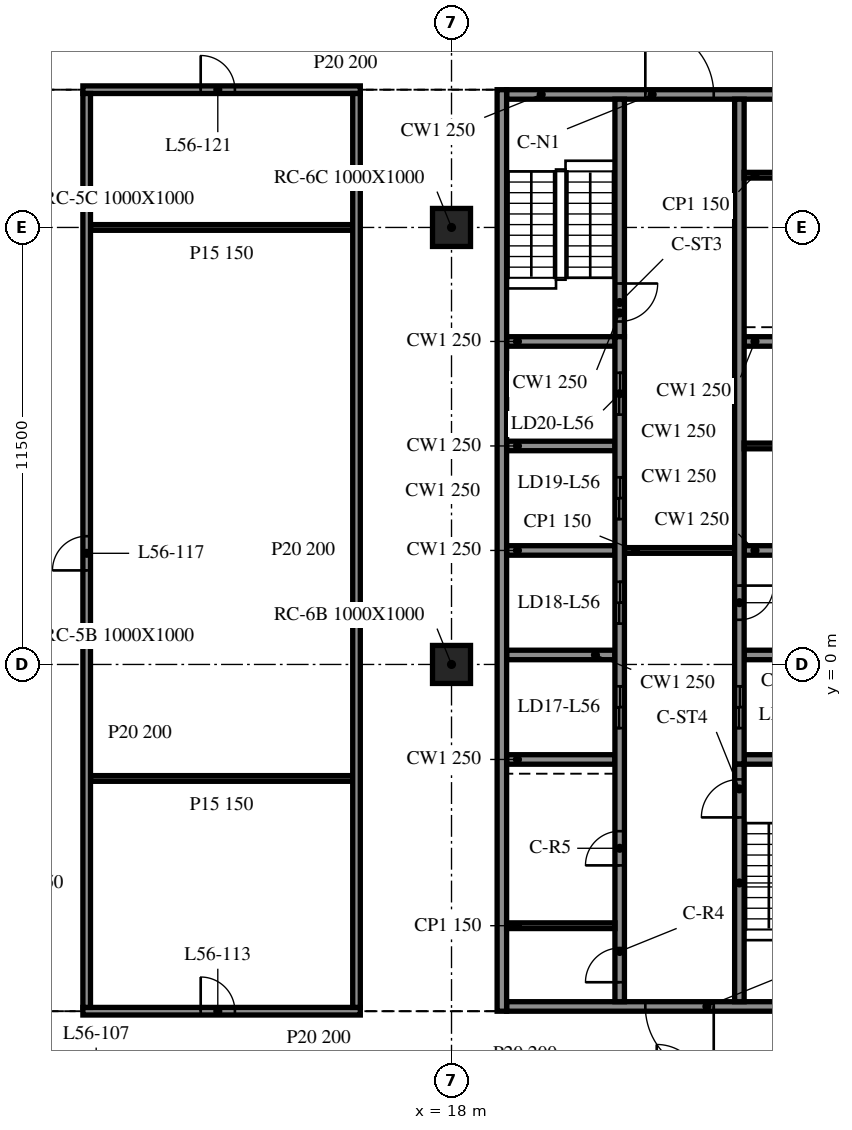
"""IFC4 building model, lengths in metres.
Left out: names, types, materials, properties, quantities, classifications, styles, units other than length and angle.
Written with IfcOpenShell. Run it as: python <this file> out.ifc"""

import sys

from ifc_helpers import new_model, si_unit, direction, frame, frame_2d, origin, origin_2d, place, context, subcontext, project, spatial, rectangle, extrude, element, fill, save


model = new_model("IFC4")
c1 = context("Model", 3, precision=1e-05, world=origin(), true_north=direction((0.0, 1.0)))
c2 = subcontext(c1, "Body", "Model", "MODEL_VIEW")
j1 = project(units=[si_unit("LENGTHUNIT", "METRE"), si_unit("PLANEANGLEUNIT", "RADIAN")], contexts=[c1])
p1 = place(None, origin())
s1 = spatial("IfcSite", under=j1, at=p1, CompositionType="ELEMENT")
p2 = place(p1, origin())
s2 = spatial("IfcBuilding", under=s1, at=p2, CompositionType="ELEMENT")
p3 = place(p2, frame((0.0, 0.0, 232.4)))
s3 = spatial("IfcBuildingStorey", under=s2, at=p3, CompositionType="ELEMENT", Elevation=232.4)
for number, where, z_axis, x_axis in (
    (1, (18.0, 0.0, -0.34), (0.0, 0.0, 1.0), (1.0, 0.0, 0.0)),
    (2, (18.0, 11.5, -0.34), (0.0, 0.0, 1.0), (1.0, 0.0, 0.0)),
):
    element("IfcColumn", number, at=place(p3, frame(where, z_axis=z_axis, x_axis=x_axis)), inside=s3, PredefinedType="COLUMN", context=c2, shape_type="SweptSolid", body=[
        extrude(rectangle(XDim=1.0, YDim=1.0, at=origin_2d()), origin(), (0.0, 0.0, 1.0), 3.8),
    ])
p4 = place(p3, frame((19.325, 15.125, 0.0), z_axis=(0.0, 0.0, 1.0), x_axis=(0.0, -1.0, 0.0)))
e3 = element("IfcWall", 3, at=p4, inside=s3, PredefinedType="SOLIDWALL", context=c2, shape_type="SweptSolid", body=[
    extrude(rectangle(XDim=24.25, YDim=0.25, at=frame_2d((12.125, 0.0))), origin(), (0.0, 0.0, 1.0), 3.46),
])
p5 = place(p3, frame((28.55, -9.0, 0.0), z_axis=(0.0, 0.0, 1.0), x_axis=(-1.0, 0.0, 0.0)))
e4 = element("IfcWall", 4, at=p5, inside=s3, PredefinedType="SOLIDWALL", context=c2, shape_type="SweptSolid", body=[
    extrude(rectangle(XDim=9.1, YDim=0.25, at=frame_2d((4.55, 0.0))), origin(), (0.0, 0.0, 1.0), 3.46),
])
p6 = place(p5, frame((3.65, 0.0, 0.0)))
e5 = element("IfcOpeningElement", 5, at=p6, cuts=e4, PredefinedType="OPENING", context=c2, shape_type="SweptSolid", body=[
    extrude(rectangle(XDim=1.8, YDim=2.1, at=frame_2d((0.9, 1.05))), frame((0.0, 0.135, 0.0), z_axis=(0.0, -1.0, 0.0), x_axis=(1.0, 0.0, 0.0)), (0.0, 0.0, 1.0), 0.27),
])
p7 = place(p3, frame((19.45, 15.0, 0.0), z_axis=(0.0, 0.0, 1.0), x_axis=(1.0, 0.0, 0.0)))
e6 = element("IfcWall", 6, at=p7, inside=s3, PredefinedType="SOLIDWALL", context=c2, shape_type="SweptSolid", body=[
    extrude(rectangle(XDim=9.1, YDim=0.25, at=frame_2d((4.55, 0.0))), origin(), (0.0, 0.0, 1.0), 3.46),
])
p8 = place(p7, frame((3.65, 0.0, 0.0)))
e7 = element("IfcOpeningElement", 7, at=p8, cuts=e6, PredefinedType="OPENING", context=c2, shape_type="SweptSolid", body=[
    extrude(rectangle(XDim=1.8, YDim=2.1, at=frame_2d((0.9, 1.05))), frame((0.0, 0.135, 0.0), z_axis=(0.0, -1.0, 0.0), x_axis=(1.0, 0.0, 0.0)), (0.0, 0.0, 1.0), 0.27),
])
p9 = place(p3, frame((22.425, -8.875, 0.0), z_axis=(0.0, 0.0, 1.0), x_axis=(0.0, 1.0, 0.0)))
e8 = element("IfcWall", 8, at=p9, inside=s3, PredefinedType="SOLIDWALL", context=c2, shape_type="SweptSolid", body=[
    extrude(rectangle(XDim=17.5, YDim=0.25, at=frame_2d((8.75, 0.0))), origin(), (0.0, 0.0, 1.0), 3.46),
])
p10 = place(p9, frame((7.2, 0.0, 0.0)))
e9 = element("IfcOpeningElement", 9, at=p10, cuts=e8, PredefinedType="OPENING", context=c2, shape_type="SweptSolid", body=[
    extrude(rectangle(XDim=1.1, YDim=2.1, at=frame_2d((0.55, 1.05))), frame((0.0, 0.135, 0.0), z_axis=(0.0, -1.0, 0.0), x_axis=(1.0, 0.0, 0.0)), (0.0, 0.0, 1.0), 0.27),
])
p11 = place(p9, frame((9.95, 0.0, 0.0)))
e10 = element("IfcOpeningElement", 10, at=p11, cuts=e8, PredefinedType="OPENING", context=c2, shape_type="SweptSolid", body=[
    extrude(rectangle(XDim=1.1, YDim=2.1, at=frame_2d((0.55, 1.05))), frame((0.0, 0.135, 0.0), z_axis=(0.0, -1.0, 0.0), x_axis=(1.0, 0.0, 0.0)), (0.0, 0.0, 1.0), 0.27),
])
p12 = place(p9, frame((12.7, 0.0, 0.0)))
e11 = element("IfcOpeningElement", 11, at=p12, cuts=e8, PredefinedType="OPENING", context=c2, shape_type="SweptSolid", body=[
    extrude(rectangle(XDim=1.1, YDim=2.1, at=frame_2d((0.55, 1.05))), frame((0.0, 0.135, 0.0), z_axis=(0.0, -1.0, 0.0), x_axis=(1.0, 0.0, 0.0)), (0.0, 0.0, 1.0), 0.27),
])
p13 = place(p9, frame((15.45, 0.0, 0.0)))
e12 = element("IfcOpeningElement", 12, at=p13, cuts=e8, PredefinedType="OPENING", context=c2, shape_type="SweptSolid", body=[
    extrude(rectangle(XDim=1.1, YDim=2.1, at=frame_2d((0.55, 1.05))), frame((0.0, 0.135, 0.0), z_axis=(0.0, -1.0, 0.0), x_axis=(1.0, 0.0, 0.0)), (0.0, 0.0, 1.0), 0.27),
])
p14 = place(p9, frame((0.512, 0.0, 0.0)))
e13 = element("IfcOpeningElement", 13, at=p14, cuts=e8, PredefinedType="OPENING", context=c2, shape_type="SweptSolid", body=[
    extrude(rectangle(XDim=0.9, YDim=2.1, at=frame_2d((0.45, 1.05))), frame((0.0, 0.135, 0.0), z_axis=(0.0, -1.0, 0.0), x_axis=(1.0, 0.0, 0.0)), (0.0, 0.0, 1.0), 0.27),
])
p15 = place(p9, frame((3.587, 0.0, 0.0)))
e14 = element("IfcOpeningElement", 14, at=p15, cuts=e8, PredefinedType="OPENING", context=c2, shape_type="SweptSolid", body=[
    extrude(rectangle(XDim=0.9, YDim=2.1, at=frame_2d((0.45, 1.05))), frame((0.0, 0.135, 0.0), z_axis=(0.0, -1.0, 0.0), x_axis=(1.0, 0.0, 0.0)), (0.0, 0.0, 1.0), 0.27),
])
p16 = place(p3, frame((22.425, 14.875, 0.0), z_axis=(0.0, 0.0, 1.0), x_axis=(0.0, -1.0, 0.0)))
e15 = element("IfcWall", 15, at=p16, inside=s3, PredefinedType="SOLIDWALL", context=c2, shape_type="SweptSolid", body=[
    extrude(rectangle(XDim=6.25, YDim=0.25, at=frame_2d((3.125, 0.0))), origin(), (0.0, 0.0, 1.0), 3.46),
])
p17 = place(p16, frame((4.85, 0.0, 0.0)))
e16 = element("IfcOpeningElement", 16, at=p17, cuts=e15, PredefinedType="OPENING", context=c2, shape_type="SweptSolid", body=[
    extrude(rectangle(XDim=1.0, YDim=2.1, at=frame_2d((0.5, 1.05))), frame((0.0, 0.135, 0.0), z_axis=(0.0, -1.0, 0.0), x_axis=(1.0, 0.0, 0.0)), (0.0, 0.0, 1.0), 0.27),
])
p18 = place(p3, frame((25.575, -8.875, 0.0), z_axis=(0.0, 0.0, 1.0), x_axis=(0.0, 1.0, 0.0)))
e17 = element("IfcWall", 17, at=p18, inside=s3, PredefinedType="SOLIDWALL", context=c2, shape_type="SweptSolid", body=[
    extrude(rectangle(XDim=6.25, YDim=0.25, at=frame_2d((3.125, 0.0))), origin(), (0.0, 0.0, 1.0), 3.46),
])
p19 = place(p18, frame((4.85, 0.0, 0.0)))
e18 = element("IfcOpeningElement", 18, at=p19, cuts=e17, PredefinedType="OPENING", context=c2, shape_type="SweptSolid", body=[
    extrude(rectangle(XDim=1.0, YDim=2.1, at=frame_2d((0.5, 1.05))), frame((0.0, 0.135, 0.0), z_axis=(0.0, -1.0, 0.0), x_axis=(1.0, 0.0, 0.0)), (0.0, 0.0, 1.0), 0.27),
])
p20 = place(p3, frame((25.575, 14.875, 0.0), z_axis=(0.0, 0.0, 1.0), x_axis=(0.0, -1.0, 0.0)))
e19 = element("IfcWall", 19, at=p20, inside=s3, PredefinedType="SOLIDWALL", context=c2, shape_type="SweptSolid", body=[
    extrude(rectangle(XDim=17.5, YDim=0.25, at=frame_2d((8.75, 0.0))), origin(), (0.0, 0.0, 1.0), 3.46),
])
p21 = place(p20, frame((15.45, 0.0, 0.0)))
e20 = element("IfcOpeningElement", 20, at=p21, cuts=e19, PredefinedType="OPENING", context=c2, shape_type="SweptSolid", body=[
    extrude(rectangle(XDim=1.1, YDim=2.1, at=frame_2d((0.55, 1.05))), frame((0.0, 0.135, 0.0), z_axis=(0.0, -1.0, 0.0), x_axis=(1.0, 0.0, 0.0)), (0.0, 0.0, 1.0), 0.27),
])
p22 = place(p20, frame((12.8, 0.0, 0.0)))
e21 = element("IfcOpeningElement", 21, at=p22, cuts=e19, PredefinedType="OPENING", context=c2, shape_type="SweptSolid", body=[
    extrude(rectangle(XDim=0.9, YDim=2.1, at=frame_2d((0.45, 1.05))), frame((0.0, 0.135, 0.0), z_axis=(0.0, -1.0, 0.0), x_axis=(1.0, 0.0, 0.0)), (0.0, 0.0, 1.0), 0.27),
])
for number, where, z_axis, x_axis in (
    (22, (19.45, -2.5, 0.0), (0.0, 0.0, 1.0), (1.0, 0.0, 0.0)),
    (23, (19.45, 0.25, 0.0), (0.0, 0.0, 1.0), (1.0, 0.0, 0.0)),
    (24, (19.45, 3.0, 0.0), (0.0, 0.0, 1.0), (1.0, 0.0, 0.0)),
    (25, (19.45, 5.75, 0.0), (0.0, 0.0, 1.0), (1.0, 0.0, 0.0)),
    (26, (19.45, 8.5, 0.0), (0.0, 0.0, 1.0), (1.0, 0.0, 0.0)),
    (27, (25.7, -2.5, 0.0), (0.0, 0.0, 1.0), (1.0, 0.0, 0.0)),
    (28, (25.7, 0.25, 0.0), (0.0, 0.0, 1.0), (1.0, 0.0, 0.0)),
    (29, (25.7, 3.0, 0.0), (0.0, 0.0, 1.0), (1.0, 0.0, 0.0)),
    (30, (25.7, 8.5, 0.0), (0.0, 0.0, 1.0), (1.0, 0.0, 0.0)),
):
    element("IfcWall", number, at=place(p3, frame(where, z_axis=z_axis, x_axis=x_axis)), inside=s3, PredefinedType="SOLIDWALL", context=c2, shape_type="SweptSolid", body=[
        extrude(rectangle(XDim=2.85, YDim=0.25, at=frame_2d((1.425, 0.0))), origin(), (0.0, 0.0, 1.0), 3.46),
    ])
p23 = place(p3, frame((22.55, 3.0, 0.0), z_axis=(0.0, 0.0, 1.0), x_axis=(1.0, 0.0, 0.0)))
e31 = element("IfcWall", 31, at=p23, inside=s3, PredefinedType="PARTITIONING", context=c2, shape_type="SweptSolid", body=[
    extrude(rectangle(XDim=2.9, YDim=0.15, at=frame_2d((1.45, 0.0))), origin(), (0.0, 0.0, 1.0), 3.46),
])
for number, where, z_axis, x_axis in (
    (32, (25.7, 5.75, 0.0), (0.0, 0.0, 1.0), (1.0, 0.0, 0.0)),
    (33, (19.45, -6.875, 0.0), (0.0, 0.0, 1.0), (1.0, 0.0, 0.0)),
    (34, (25.7, 12.875, 0.0), (0.0, 0.0, 1.0), (1.0, 0.0, 0.0)),
):
    element("IfcWall", number, at=place(p3, frame(where, z_axis=z_axis, x_axis=x_axis)), inside=s3, PredefinedType="PARTITIONING", context=c2, shape_type="SweptSolid", body=[
        extrude(rectangle(XDim=2.85, YDim=0.15, at=frame_2d((1.425, 0.0))), origin(), (0.0, 0.0, 1.0), 3.46),
    ])
p24 = place(p3, frame((8.3, -9.125, 0.0), z_axis=(0.0, 0.0, 1.0), x_axis=(1.0, 0.0, 0.0)))
e35 = element("IfcWall", 35, at=p24, inside=s3, PredefinedType="PARTITIONING", context=c2, shape_type="SweptSolid", body=[
    extrude(rectangle(XDim=7.3, YDim=0.2, at=frame_2d((3.65, 0.0))), origin(), (0.0, 0.0, 1.0), 3.46),
])
p25 = place(p24, frame((3.1, 0.0, 0.0)))
e36 = element("IfcOpeningElement", 36, at=p25, cuts=e35, PredefinedType="OPENING", context=c2, shape_type="SweptSolid", body=[
    extrude(rectangle(XDim=0.9, YDim=2.1, at=frame_2d((0.45, 1.05))), frame((0.0, 0.11, 0.0), z_axis=(0.0, -1.0, 0.0), x_axis=(1.0, 0.0, 0.0)), (0.0, 0.0, 1.0), 0.22),
])
for number, where, z_axis, x_axis in (
    (37, (8.5, -3.0, 0.0), (0.0, 0.0, 1.0), (1.0, 0.0, 0.0)),
    (38, (8.5, 11.5, 0.0), (0.0, 0.0, 1.0), (1.0, 0.0, 0.0)),
):
    element("IfcWall", number, at=place(p3, frame(where, z_axis=z_axis, x_axis=x_axis)), inside=s3, PredefinedType="PARTITIONING", context=c2, shape_type="SweptSolid", body=[
        extrude(rectangle(XDim=6.9, YDim=0.15, at=frame_2d((3.45, 0.0))), origin(), (0.0, 0.0, 1.0), 3.46),
    ])
p26 = place(p3, frame((8.3, 15.125, 0.0), z_axis=(0.0, 0.0, 1.0), x_axis=(1.0, 0.0, 0.0)))
e39 = element("IfcWall", 39, at=p26, inside=s3, PredefinedType="PARTITIONING", context=c2, shape_type="SweptSolid", body=[
    extrude(rectangle(XDim=7.3, YDim=0.2, at=frame_2d((3.65, 0.0))), origin(), (0.0, 0.0, 1.0), 3.46),
])
p27 = place(p26, frame((3.1, 0.0, 0.0)))
e40 = element("IfcOpeningElement", 40, at=p27, cuts=e39, PredefinedType="OPENING", context=c2, shape_type="SweptSolid", body=[
    extrude(rectangle(XDim=0.9, YDim=2.1, at=frame_2d((0.45, 1.05))), frame((0.0, 0.11, 0.0), z_axis=(0.0, -1.0, 0.0), x_axis=(1.0, 0.0, 0.0)), (0.0, 0.0, 1.0), 0.22),
])
p28 = place(p3, frame((8.4, -9.025, 0.0), z_axis=(0.0, 0.0, 1.0), x_axis=(0.0, 1.0, 0.0)))
e41 = element("IfcWall", 41, at=p28, inside=s3, PredefinedType="PARTITIONING", context=c2, shape_type="SweptSolid", body=[
    extrude(rectangle(XDim=24.05, YDim=0.2, at=frame_2d((12.025, 0.0))), origin(), (0.0, 0.0, 1.0), 3.46),
])
p29 = place(p28, frame((11.5, 0.0, 0.0)))
e42 = element("IfcOpeningElement", 42, at=p29, cuts=e41, PredefinedType="OPENING", context=c2, shape_type="SweptSolid", body=[
    extrude(rectangle(XDim=0.9, YDim=2.1, at=frame_2d((0.45, 1.05))), frame((0.0, 0.11, 0.0), z_axis=(0.0, -1.0, 0.0), x_axis=(1.0, 0.0, 0.0)), (0.0, 0.0, 1.0), 0.22),
])
p30 = place(p3, frame((15.5, -9.025, 0.0), z_axis=(0.0, 0.0, 1.0), x_axis=(0.0, 1.0, 0.0)))
e43 = element("IfcWall", 43, at=p30, inside=s3, PredefinedType="PARTITIONING", context=c2, shape_type="SweptSolid", body=[
    extrude(rectangle(XDim=24.05, YDim=0.2, at=frame_2d((12.025, 0.0))), origin(), (0.0, 0.0, 1.0), 3.46),
])
p31 = place(p6, origin())
e44 = element("IfcDoor", 44, at=p31, inside=s3, OperationType="DOUBLE_DOOR_SINGLE_SWING", PredefinedType="DOOR", context=c2, shape_type="SweptSolid", body=[
    extrude(rectangle(XDim=1.8, YDim=2.1, at=frame_2d((0.9, 1.05))), frame((0.0, 0.025, 0.0), z_axis=(0.0, -1.0, 0.0), x_axis=(1.0, 0.0, 0.0)), (0.0, 0.0, 1.0), 0.05),
])
fill(e5, e44)
p32 = place(p8, origin())
e45 = element("IfcDoor", 45, at=p32, inside=s3, OperationType="DOUBLE_DOOR_SINGLE_SWING", PredefinedType="DOOR", context=c2, shape_type="SweptSolid", body=[
    extrude(rectangle(XDim=1.8, YDim=2.1, at=frame_2d((0.9, 1.05))), frame((0.0, 0.025, 0.0), z_axis=(0.0, -1.0, 0.0), x_axis=(1.0, 0.0, 0.0)), (0.0, 0.0, 1.0), 0.05),
])
fill(e7, e45)
p33 = place(p21, origin())
e46 = element("IfcDoor", 46, at=p33, inside=s3, OperationType="DOUBLE_DOOR_SLIDING", PredefinedType="DOOR", context=c2, shape_type="SweptSolid", body=[
    extrude(rectangle(XDim=1.1, YDim=2.1, at=frame_2d((0.55, 1.05))), frame((0.0, 0.025, 0.0), z_axis=(0.0, -1.0, 0.0), x_axis=(1.0, 0.0, 0.0)), (0.0, 0.0, 1.0), 0.05),
])
fill(e20, e46)
p34 = place(p10, origin())
e47 = element("IfcDoor", 47, at=p34, inside=s3, OperationType="DOUBLE_DOOR_SLIDING", PredefinedType="DOOR", context=c2, shape_type="SweptSolid", body=[
    extrude(rectangle(XDim=1.1, YDim=2.1, at=frame_2d((0.55, 1.05))), frame((0.0, 0.025, 0.0), z_axis=(0.0, -1.0, 0.0), x_axis=(1.0, 0.0, 0.0)), (0.0, 0.0, 1.0), 0.05),
])
fill(e9, e47)
p35 = place(p11, origin())
e48 = element("IfcDoor", 48, at=p35, inside=s3, OperationType="DOUBLE_DOOR_SLIDING", PredefinedType="DOOR", context=c2, shape_type="SweptSolid", body=[
    extrude(rectangle(XDim=1.1, YDim=2.1, at=frame_2d((0.55, 1.05))), frame((0.0, 0.025, 0.0), z_axis=(0.0, -1.0, 0.0), x_axis=(1.0, 0.0, 0.0)), (0.0, 0.0, 1.0), 0.05),
])
fill(e10, e48)
p36 = place(p12, origin())
e49 = element("IfcDoor", 49, at=p36, inside=s3, OperationType="DOUBLE_DOOR_SLIDING", PredefinedType="DOOR", context=c2, shape_type="SweptSolid", body=[
    extrude(rectangle(XDim=1.1, YDim=2.1, at=frame_2d((0.55, 1.05))), frame((0.0, 0.025, 0.0), z_axis=(0.0, -1.0, 0.0), x_axis=(1.0, 0.0, 0.0)), (0.0, 0.0, 1.0), 0.05),
])
fill(e11, e49)
p37 = place(p13, origin())
e50 = element("IfcDoor", 50, at=p37, inside=s3, OperationType="DOUBLE_DOOR_SLIDING", PredefinedType="DOOR", context=c2, shape_type="SweptSolid", body=[
    extrude(rectangle(XDim=1.1, YDim=2.1, at=frame_2d((0.55, 1.05))), frame((0.0, 0.025, 0.0), z_axis=(0.0, -1.0, 0.0), x_axis=(1.0, 0.0, 0.0)), (0.0, 0.0, 1.0), 0.05),
])
fill(e12, e50)
p38 = place(p22, origin())
e51 = element("IfcDoor", 51, at=p38, inside=s3, OperationType="SINGLE_SWING_LEFT", PredefinedType="DOOR", context=c2, shape_type="SweptSolid", body=[
    extrude(rectangle(XDim=0.9, YDim=2.1, at=frame_2d((0.45, 1.05))), frame((0.0, 0.025, 0.0), z_axis=(0.0, -1.0, 0.0), x_axis=(1.0, 0.0, 0.0)), (0.0, 0.0, 1.0), 0.05),
])
fill(e21, e51)
p39 = place(p14, origin())
e52 = element("IfcDoor", 52, at=p39, inside=s3, OperationType="SINGLE_SWING_RIGHT", PredefinedType="DOOR", context=c2, shape_type="SweptSolid", body=[
    extrude(rectangle(XDim=0.9, YDim=2.1, at=frame_2d((0.45, 1.05))), frame((0.0, 0.025, 0.0), z_axis=(0.0, -1.0, 0.0), x_axis=(1.0, 0.0, 0.0)), (0.0, 0.0, 1.0), 0.05),
])
fill(e13, e52)
p40 = place(p15, origin())
e53 = element("IfcDoor", 53, at=p40, inside=s3, OperationType="SINGLE_SWING_LEFT", PredefinedType="DOOR", context=c2, shape_type="SweptSolid", body=[
    extrude(rectangle(XDim=0.9, YDim=2.1, at=frame_2d((0.45, 1.05))), frame((0.0, 0.025, 0.0), z_axis=(0.0, -1.0, 0.0), x_axis=(1.0, 0.0, 0.0)), (0.0, 0.0, 1.0), 0.05),
])
fill(e14, e53)
p41 = place(p17, origin())
e54 = element("IfcDoor", 54, at=p41, inside=s3, OperationType="SINGLE_SWING_RIGHT", PredefinedType="DOOR", context=c2, shape_type="SweptSolid", body=[
    extrude(rectangle(XDim=1.0, YDim=2.1, at=frame_2d((0.5, 1.05))), frame((0.0, 0.025, 0.0), z_axis=(0.0, -1.0, 0.0), x_axis=(1.0, 0.0, 0.0)), (0.0, 0.0, 1.0), 0.05),
])
fill(e16, e54)
p42 = place(p19, origin())
e55 = element("IfcDoor", 55, at=p42, inside=s3, OperationType="SINGLE_SWING_LEFT", PredefinedType="DOOR", context=c2, shape_type="SweptSolid", body=[
    extrude(rectangle(XDim=1.0, YDim=2.1, at=frame_2d((0.5, 1.05))), frame((0.0, 0.025, 0.0), z_axis=(0.0, -1.0, 0.0), x_axis=(1.0, 0.0, 0.0)), (0.0, 0.0, 1.0), 0.05),
])
fill(e18, e55)
p43 = place(p25, origin())
e56 = element("IfcDoor", 56, at=p43, inside=s3, OperationType="SINGLE_SWING_LEFT", PredefinedType="DOOR", context=c2, shape_type="SweptSolid", body=[
    extrude(rectangle(XDim=0.9, YDim=2.1, at=frame_2d((0.45, 1.05))), frame((0.0, 0.025, 0.0), z_axis=(0.0, -1.0, 0.0), x_axis=(1.0, 0.0, 0.0)), (0.0, 0.0, 1.0), 0.05),
])
fill(e36, e56)
p44 = place(p29, origin())
e57 = element("IfcDoor", 57, at=p44, inside=s3, OperationType="SINGLE_SWING_RIGHT", PredefinedType="DOOR", context=c2, shape_type="SweptSolid", body=[
    extrude(rectangle(XDim=0.9, YDim=2.1, at=frame_2d((0.45, 1.05))), frame((0.0, 0.025, 0.0), z_axis=(0.0, -1.0, 0.0), x_axis=(1.0, 0.0, 0.0)), (0.0, 0.0, 1.0), 0.05),
])
fill(e42, e57)
p45 = place(p27, origin())
e58 = element("IfcDoor", 58, at=p45, inside=s3, OperationType="SINGLE_SWING_RIGHT", PredefinedType="DOOR", context=c2, shape_type="SweptSolid", body=[
    extrude(rectangle(XDim=0.9, YDim=2.1, at=frame_2d((0.45, 1.05))), frame((0.0, 0.025, 0.0), z_axis=(0.0, -1.0, 0.0), x_axis=(1.0, 0.0, 0.0)), (0.0, 0.0, 1.0), 0.05),
])
fill(e40, e58)
save(model, sys.argv[1])
